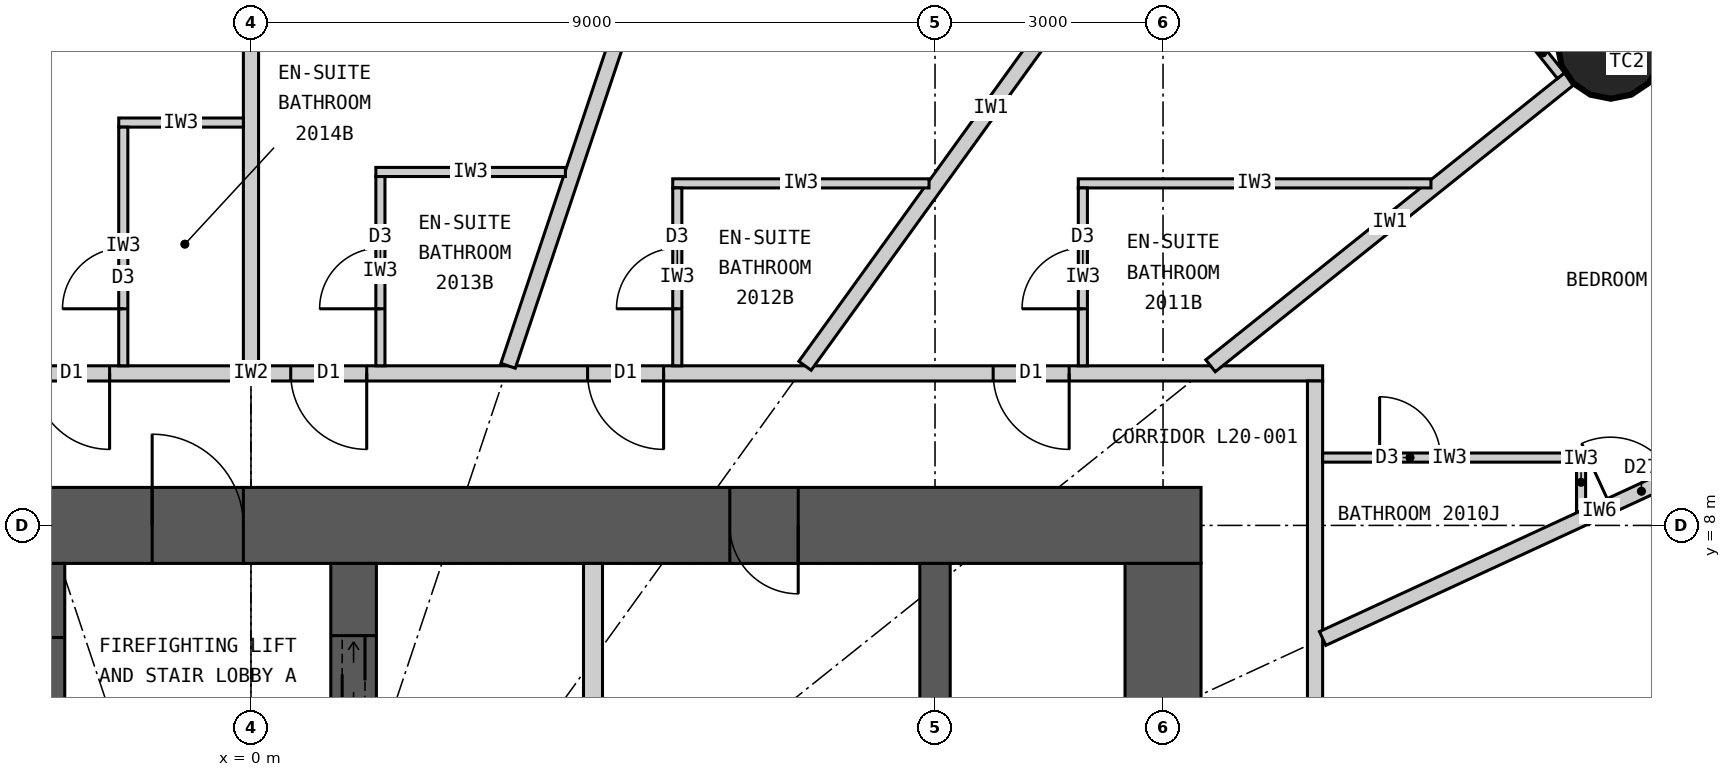
"""IFC4 building model, lengths in metres.
Left out: names, types, materials, properties, quantities, classifications, styles, units other than length and angle.
Written with IfcOpenShell. Run it as: python <this file> out.ifc"""

import sys

from ifc_helpers import new_model, si_unit, direction, frame, frame_2d, origin, origin_2d, place, context, subcontext, project, spatial, rectangle, circle, extrude, element, fill, save


model = new_model("IFC4")
c1 = context("Model", 3, precision=1e-05, world=origin(), true_north=direction((0.0, 1.0)))
c2 = subcontext(c1, "Body", "Model", "MODEL_VIEW")
j1 = project(units=[si_unit("LENGTHUNIT", "METRE"), si_unit("PLANEANGLEUNIT", "RADIAN")], contexts=[c1])
p1 = place(None, origin())
s1 = spatial("IfcSite", under=j1, at=p1, CompositionType="ELEMENT")
p2 = place(p1, origin())
s2 = spatial("IfcBuilding", under=s1, at=p2, CompositionType="ELEMENT")
p3 = place(p2, frame((0.0, 0.0, 80.4)))
s3 = spatial("IfcBuildingStorey", under=s2, at=p3, CompositionType="ELEMENT", Elevation=80.4)
p4 = place(p3, frame((17.892, 14.313, 0.0), z_axis=(0.0, 0.0, 1.0), x_axis=(1.0, 0.0, 0.0)))
e1 = element("IfcColumn", 1, at=p4, inside=s3, PredefinedType="COLUMN", context=c2, shape_type="SweptSolid", body=[
    extrude(circle(Radius=0.7, at=origin_2d()), origin(), (0.0, 0.0, 1.0), 3.3),
])
p5 = place(p3, frame((-12.5, 8.0, 0.0), z_axis=(0.0, 0.0, 1.0), x_axis=(1.0, 0.0, 0.0)))
e2 = element("IfcWall", 2, at=p5, inside=s3, PredefinedType="SHEAR", context=c2, shape_type="SweptSolid", body=[
    extrude(rectangle(XDim=25.0, YDim=1.0, at=frame_2d((12.5, 0.0))), origin(), (0.0, 0.0, 1.0), 3.3),
])
p6 = place(p5, frame((11.2, 0.0, 0.0)))
e3 = element("IfcOpeningElement", 3, at=p6, cuts=e2, PredefinedType="OPENING", context=c2, shape_type="SweptSolid", body=[
    extrude(rectangle(XDim=1.2, YDim=2.2, at=frame_2d((0.6, 1.1))), frame((0.0, 0.51, 0.0), z_axis=(0.0, -1.0, 0.0), x_axis=(1.0, 0.0, 0.0)), (0.0, 0.0, 1.0), 1.02),
])
p7 = place(p5, frame((18.8, 0.0, 0.0)))
e4 = element("IfcOpeningElement", 4, at=p7, cuts=e2, PredefinedType="OPENING", context=c2, shape_type="SweptSolid", body=[
    extrude(rectangle(XDim=0.9, YDim=2.2, at=frame_2d((0.45, 1.1))), frame((0.0, 0.51, 0.0), z_axis=(0.0, -1.0, 0.0), x_axis=(1.0, 0.0, 0.0)), (0.0, 0.0, 1.0), 1.02),
])
p8 = place(p3, frame((12.0, -7.5, 0.0), z_axis=(0.0, 0.0, 1.0), x_axis=(0.0, 1.0, 0.0)))
e5 = element("IfcWall", 5, at=p8, inside=s3, PredefinedType="SHEAR", context=c2, shape_type="SweptSolid", body=[
    extrude(rectangle(XDim=15.0, YDim=1.0, at=frame_2d((7.5, 0.0))), origin(), (0.0, 0.0, 1.0), 3.3),
])
p9 = place(p8, frame((6.6, 0.0, 0.0)))
e6 = element("IfcOpeningElement", 6, at=p9, cuts=e5, PredefinedType="OPENING", context=c2, shape_type="SweptSolid", body=[
    extrude(rectangle(XDim=1.8, YDim=2.2, at=frame_2d((0.9, 1.1))), frame((0.0, 0.51, 0.0), z_axis=(0.0, -1.0, 0.0), x_axis=(1.0, 0.0, 0.0)), (0.0, 0.0, 1.0), 1.02),
])
p10 = place(p3, frame((9.0, 4.5, 0.0), z_axis=(0.0, 0.0, 1.0), x_axis=(0.0, 1.0, 0.0)))
e7 = element("IfcWall", 7, at=p10, inside=s3, PredefinedType="SHEAR", context=c2, shape_type="SweptSolid", body=[
    extrude(rectangle(XDim=3.0, YDim=0.4, at=frame_2d((1.5, 0.0))), origin(), (0.0, 0.0, 1.0), 3.3),
])
p11 = place(p3, frame((-2.75, 4.5, 0.0), z_axis=(0.0, 0.0, 1.0), x_axis=(0.0, 1.0, 0.0)))
e8 = element("IfcWall", 8, at=p11, inside=s3, PredefinedType="SHEAR", context=c2, shape_type="SweptSolid", body=[
    extrude(rectangle(XDim=3.0, YDim=0.6, at=frame_2d((1.5, 0.0))), origin(), (0.0, 0.0, 1.0), 3.3),
])
p12 = place(p11, frame((0.925, 0.0, 0.0)))
e9 = element("IfcOpeningElement", 9, at=p12, cuts=e8, PredefinedType="OPENING", context=c2, shape_type="SweptSolid", body=[
    extrude(rectangle(XDim=1.1, YDim=2.2, at=frame_2d((0.55, 1.1))), frame((0.0, 0.31, 0.0), z_axis=(0.0, -1.0, 0.0), x_axis=(1.0, 0.0, 0.0)), (0.0, 0.0, 1.0), 0.62),
])
p13 = place(p3, frame((1.35, 4.5, 0.0), z_axis=(0.0, 0.0, 1.0), x_axis=(0.0, 1.0, 0.0)))
e10 = element("IfcWall", 10, at=p13, inside=s3, PredefinedType="SHEAR", context=c2, shape_type="SweptSolid", body=[
    extrude(rectangle(XDim=3.0, YDim=0.6, at=frame_2d((1.5, 0.0))), origin(), (0.0, 0.0, 1.0), 3.3),
])
p14 = place(p13, frame((0.95, 0.0, 0.0)))
e11 = element("IfcOpeningElement", 11, at=p14, cuts=e10, PredefinedType="OPENING", context=c2, shape_type="SweptSolid", body=[
    extrude(rectangle(XDim=1.1, YDim=2.2, at=frame_2d((0.55, 1.1))), frame((0.0, 0.31, 0.0), z_axis=(0.0, -1.0, 0.0), x_axis=(1.0, 0.0, 0.0)), (0.0, 0.0, 1.0), 0.62),
])
p15 = place(p3, frame((4.5, 4.5, 0.0), z_axis=(0.0, 0.0, 1.0), x_axis=(0.0, 1.0, 0.0)))
e12 = element("IfcWall", 12, at=p15, inside=s3, PredefinedType="PARTITIONING", context=c2, shape_type="SweptSolid", body=[
    extrude(rectangle(XDim=3.0, YDim=0.25, at=frame_2d((1.5, 0.0))), origin(), (0.0, 0.0, 1.0), 3.3),
])
p16 = place(p3, frame((-14.1, 10.0, 0.0), z_axis=(0.0, 0.0, 1.0), x_axis=(1.0, 0.0, 0.0)))
e13 = element("IfcWall", 13, at=p16, inside=s3, PredefinedType="PARTITIONING", context=c2, shape_type="SweptSolid", body=[
    extrude(rectangle(XDim=28.2, YDim=0.2, at=frame_2d((14.1, 0.0))), origin(), (0.0, 0.0, 1.0), 3.12),
])
p17 = place(p16, frame((23.865, 0.0, 0.0)))
e14 = element("IfcOpeningElement", 14, at=p17, cuts=e13, PredefinedType="OPENING", context=c2, shape_type="SweptSolid", body=[
    extrude(rectangle(XDim=1.0, YDim=2.2, at=frame_2d((0.5, 1.1))), frame((0.0, 0.11, 0.0), z_axis=(0.0, -1.0, 0.0), x_axis=(1.0, 0.0, 0.0)), (0.0, 0.0, 1.0), 0.22),
])
p18 = place(p16, frame((18.529, 0.0, 0.0)))
e15 = element("IfcOpeningElement", 15, at=p18, cuts=e13, PredefinedType="OPENING", context=c2, shape_type="SweptSolid", body=[
    extrude(rectangle(XDim=1.0, YDim=2.2, at=frame_2d((0.5, 1.1))), frame((0.0, 0.11, 0.0), z_axis=(0.0, -1.0, 0.0), x_axis=(1.0, 0.0, 0.0)), (0.0, 0.0, 1.0), 0.22),
])
p19 = place(p16, frame((14.623, 0.0, 0.0)))
e16 = element("IfcOpeningElement", 16, at=p19, cuts=e13, PredefinedType="OPENING", context=c2, shape_type="SweptSolid", body=[
    extrude(rectangle(XDim=1.0, YDim=2.2, at=frame_2d((0.5, 1.1))), frame((0.0, 0.11, 0.0), z_axis=(0.0, -1.0, 0.0), x_axis=(1.0, 0.0, 0.0)), (0.0, 0.0, 1.0), 0.22),
])
p20 = place(p16, frame((11.24, 0.0, 0.0)))
e17 = element("IfcOpeningElement", 17, at=p20, cuts=e13, PredefinedType="OPENING", context=c2, shape_type="SweptSolid", body=[
    extrude(rectangle(XDim=1.0, YDim=2.2, at=frame_2d((0.5, 1.1))), frame((0.0, 0.11, 0.0), z_axis=(0.0, -1.0, 0.0), x_axis=(1.0, 0.0, 0.0)), (0.0, 0.0, 1.0), 0.22),
])
p21 = place(p16, frame((8.671, 0.0, 0.0)))
e18 = element("IfcOpeningElement", 18, at=p21, cuts=e13, PredefinedType="OPENING", context=c2, shape_type="SweptSolid", body=[
    extrude(rectangle(XDim=1.0, YDim=2.2, at=frame_2d((0.5, 1.1))), frame((0.0, 0.11, 0.0), z_axis=(0.0, -1.0, 0.0), x_axis=(1.0, 0.0, 0.0)), (0.0, 0.0, 1.0), 0.22),
])
p22 = place(p16, frame((2.801, 0.0, 0.0)))
e19 = element("IfcOpeningElement", 19, at=p22, cuts=e13, PredefinedType="OPENING", context=c2, shape_type="SweptSolid", body=[
    extrude(rectangle(XDim=1.0, YDim=2.2, at=frame_2d((0.5, 1.1))), frame((0.0, 0.11, 0.0), z_axis=(0.0, -1.0, 0.0), x_axis=(1.0, 0.0, 0.0)), (0.0, 0.0, 1.0), 0.22),
])
p23 = place(p3, frame((14.0, -9.9, 0.0), z_axis=(0.0, 0.0, 1.0), x_axis=(0.0, 1.0, 0.0)))
e20 = element("IfcWall", 20, at=p23, inside=s3, PredefinedType="PARTITIONING", context=c2, shape_type="SweptSolid", body=[
    extrude(rectangle(XDim=19.8, YDim=0.2, at=frame_2d((9.9, 0.0))), origin(), (0.0, 0.0, 1.0), 3.12),
])
p24 = place(p23, frame((5.948, 0.0, 0.0)))
e21 = element("IfcOpeningElement", 21, at=p24, cuts=e20, PredefinedType="OPENING", context=c2, shape_type="SweptSolid", body=[
    extrude(rectangle(XDim=1.0, YDim=2.2, at=frame_2d((0.5, 1.1))), frame((0.0, 0.11, 0.0), z_axis=(0.0, -1.0, 0.0), x_axis=(1.0, 0.0, 0.0)), (0.0, 0.0, 1.0), 0.22),
])
p25 = place(p23, frame((11.46, 0.0, 0.0)))
e22 = element("IfcOpeningElement", 22, at=p25, cuts=e20, PredefinedType="OPENING", context=c2, shape_type="SweptSolid", body=[
    extrude(rectangle(XDim=1.0, YDim=2.2, at=frame_2d((0.5, 1.1))), frame((0.0, 0.11, 0.0), z_axis=(0.0, -1.0, 0.0), x_axis=(1.0, 0.0, 0.0)), (0.0, 0.0, 1.0), 0.22),
])
p26 = place(p3, frame((14.1, 6.512, 0.0), z_axis=(0.0, 0.0, 1.0), x_axis=(0.907832871056, 0.419332181247, 0.0)))
e23 = element("IfcWall", 23, at=p26, inside=s3, PredefinedType="PARTITIONING", context=c2, shape_type="SweptSolid", body=[
    extrude(rectangle(XDim=8.023, YDim=0.2, at=frame_2d((4.011, 0.0))), origin(), (0.0, 0.0, 1.0), 2.32),
])
p27 = place(p26, frame((4.17, 0.0, 0.0)))
e24 = element("IfcOpeningElement", 24, at=p27, cuts=e23, PredefinedType="OPENING", context=c2, shape_type="SweptSolid", body=[
    extrude(rectangle(XDim=0.9, YDim=2.1, at=frame_2d((0.45, 1.05))), frame((0.0, 0.11, 0.0), z_axis=(0.0, -1.0, 0.0), x_axis=(1.0, 0.0, 0.0)), (0.0, 0.0, 1.0), 0.22),
])
p28 = place(p3, frame((12.625, 10.1, 0.0), z_axis=(0.0, 0.0, 1.0), x_axis=(0.780892451574, 0.624665493744, 0.0)))
e25 = element("IfcWall", 25, at=p28, inside=s3, PredefinedType="PARTITIONING", context=c2, shape_type="SweptSolid", body=[
    extrude(rectangle(XDim=6.045, YDim=0.2, at=frame_2d((3.022, 0.0))), origin(), (0.0, 0.0, 1.0), 2.32),
])
p29 = place(p3, frame((7.289, 10.1, 0.0), z_axis=(0.0, 0.0, 1.0), x_axis=(0.585198353053, 0.810890182197, 0.0)))
e26 = element("IfcWall", 26, at=p29, inside=s3, PredefinedType="PARTITIONING", context=c2, shape_type="SweptSolid", body=[
    extrude(rectangle(XDim=8.36, YDim=0.2, at=frame_2d((4.18, 0.0))), origin(), (0.0, 0.0, 1.0), 2.32),
])
p30 = place(p3, frame((3.383, 10.1, 0.0), z_axis=(0.0, 0.0, 1.0), x_axis=(0.31759592231, 0.948226149256, 0.0)))
e27 = element("IfcWall", 27, at=p30, inside=s3, PredefinedType="PARTITIONING", context=c2, shape_type="SweptSolid", body=[
    extrude(rectangle(XDim=9.098, YDim=0.2, at=frame_2d((4.549, 0.0))), origin(), (0.0, 0.0, 1.0), 2.32),
])
p31 = place(p3, frame((0.0, 10.1, 0.0), z_axis=(0.0, 0.0, 1.0), x_axis=(0.0, 1.0, 0.0)))
e28 = element("IfcWall", 28, at=p31, inside=s3, PredefinedType="PARTITIONING", context=c2, shape_type="SweptSolid", body=[
    extrude(rectangle(XDim=9.25, YDim=0.2, at=frame_2d((4.625, 0.0))), origin(), (0.0, 0.0, 1.0), 2.32),
])
p32 = place(p3, frame((17.5, 8.183, 0.0), z_axis=(0.0, 0.0, 1.0), x_axis=(0.0, 1.0, 0.0)))
e29 = element("IfcWall", 29, at=p32, inside=s3, PredefinedType="PARTITIONING", context=c2, shape_type="SweptSolid", body=[
    extrude(rectangle(XDim=0.77, YDim=0.12, at=frame_2d((0.385, 0.0))), origin(), (0.0, 0.0, 1.0), 3.12),
])
p33 = place(p3, frame((14.1, 8.893, 0.0), z_axis=(0.0, 0.0, 1.0), x_axis=(1.0, 0.0, 0.0)))
e30 = element("IfcWall", 30, at=p33, inside=s3, PredefinedType="PARTITIONING", context=c2, shape_type="SweptSolid", body=[
    extrude(rectangle(XDim=3.34, YDim=0.12, at=frame_2d((1.67, 0.0))), origin(), (0.0, 0.0, 1.0), 3.12),
])
p34 = place(p33, frame((0.75, 0.0, 0.0)))
e31 = element("IfcOpeningElement", 31, at=p34, cuts=e30, PredefinedType="OPENING", context=c2, shape_type="SweptSolid", body=[
    extrude(rectangle(XDim=0.8, YDim=2.1, at=frame_2d((0.4, 1.05))), frame((0.0, 0.07, 0.0), z_axis=(0.0, -1.0, 0.0), x_axis=(1.0, 0.0, 0.0)), (0.0, 0.0, 1.0), 0.14),
])
p35 = place(p3, frame((15.525, 12.5, 0.0), z_axis=(0.0, 0.0, 1.0), x_axis=(-1.0, 0.0, 0.0)))
e32 = element("IfcWall", 32, at=p35, inside=s3, PredefinedType="PARTITIONING", context=c2, shape_type="SweptSolid", body=[
    extrude(rectangle(XDim=4.64, YDim=0.12, at=frame_2d((2.32, 0.0))), origin(), (0.0, 0.0, 1.0), 3.12),
])
p36 = place(p3, frame((10.945, 10.1, 0.0), z_axis=(0.0, 0.0, 1.0), x_axis=(0.0, 1.0, 0.0)))
e33 = element("IfcWall", 33, at=p36, inside=s3, PredefinedType="PARTITIONING", context=c2, shape_type="SweptSolid", body=[
    extrude(rectangle(XDim=2.34, YDim=0.12, at=frame_2d((1.17, 0.0))), origin(), (0.0, 0.0, 1.0), 3.12),
])
p37 = place(p36, frame((0.75, 0.0, 0.0)))
e34 = element("IfcOpeningElement", 34, at=p37, cuts=e33, PredefinedType="OPENING", context=c2, shape_type="SweptSolid", body=[
    extrude(rectangle(XDim=0.8, YDim=2.1, at=frame_2d((0.4, 1.05))), frame((0.0, 0.07, 0.0), z_axis=(0.0, -1.0, 0.0), x_axis=(1.0, 0.0, 0.0)), (0.0, 0.0, 1.0), 0.14),
])
p38 = place(p3, frame((8.921, 12.5, 0.0), z_axis=(0.0, 0.0, 1.0), x_axis=(-1.0, 0.0, 0.0)))
e35 = element("IfcWall", 35, at=p38, inside=s3, PredefinedType="PARTITIONING", context=c2, shape_type="SweptSolid", body=[
    extrude(rectangle(XDim=3.372, YDim=0.12, at=frame_2d((1.686, 0.0))), origin(), (0.0, 0.0, 1.0), 3.12),
])
p39 = place(p3, frame((5.609, 10.1, 0.0), z_axis=(0.0, 0.0, 1.0), x_axis=(0.0, 1.0, 0.0)))
e36 = element("IfcWall", 36, at=p39, inside=s3, PredefinedType="PARTITIONING", context=c2, shape_type="SweptSolid", body=[
    extrude(rectangle(XDim=2.34, YDim=0.12, at=frame_2d((1.17, 0.0))), origin(), (0.0, 0.0, 1.0), 3.12),
])
p40 = place(p39, frame((0.75, 0.0, 0.0)))
e37 = element("IfcOpeningElement", 37, at=p40, cuts=e36, PredefinedType="OPENING", context=c2, shape_type="SweptSolid", body=[
    extrude(rectangle(XDim=0.8, YDim=2.1, at=frame_2d((0.4, 1.05))), frame((0.0, 0.07, 0.0), z_axis=(0.0, -1.0, 0.0), x_axis=(1.0, 0.0, 0.0)), (0.0, 0.0, 1.0), 0.14),
])
p41 = place(p3, frame((4.137, 12.65, 0.0), z_axis=(0.0, 0.0, 1.0), x_axis=(-1.0, 0.0, 0.0)))
e38 = element("IfcWall", 38, at=p41, inside=s3, PredefinedType="PARTITIONING", context=c2, shape_type="SweptSolid", body=[
    extrude(rectangle(XDim=2.494, YDim=0.12, at=frame_2d((1.247, 0.0))), origin(), (0.0, 0.0, 1.0), 3.12),
])
p42 = place(p3, frame((1.703, 10.1, 0.0), z_axis=(0.0, 0.0, 1.0), x_axis=(0.0, 1.0, 0.0)))
e39 = element("IfcWall", 39, at=p42, inside=s3, PredefinedType="PARTITIONING", context=c2, shape_type="SweptSolid", body=[
    extrude(rectangle(XDim=2.49, YDim=0.12, at=frame_2d((1.245, 0.0))), origin(), (0.0, 0.0, 1.0), 3.12),
])
p43 = place(p42, frame((0.75, 0.0, 0.0)))
e40 = element("IfcOpeningElement", 40, at=p43, cuts=e39, PredefinedType="OPENING", context=c2, shape_type="SweptSolid", body=[
    extrude(rectangle(XDim=0.8, YDim=2.1, at=frame_2d((0.4, 1.05))), frame((0.0, 0.07, 0.0), z_axis=(0.0, -1.0, 0.0), x_axis=(1.0, 0.0, 0.0)), (0.0, 0.0, 1.0), 0.14),
])
p44 = place(p3, frame((-0.1, 13.3, 0.0), z_axis=(0.0, 0.0, 1.0), x_axis=(-1.0, 0.0, 0.0)))
e41 = element("IfcWall", 41, at=p44, inside=s3, PredefinedType="PARTITIONING", context=c2, shape_type="SweptSolid", body=[
    extrude(rectangle(XDim=1.64, YDim=0.12, at=frame_2d((0.82, 0.0))), origin(), (0.0, 0.0, 1.0), 3.12),
])
p45 = place(p3, frame((-1.68, 10.1, 0.0), z_axis=(0.0, 0.0, 1.0), x_axis=(0.0, 1.0, 0.0)))
e42 = element("IfcWall", 42, at=p45, inside=s3, PredefinedType="PARTITIONING", context=c2, shape_type="SweptSolid", body=[
    extrude(rectangle(XDim=3.14, YDim=0.12, at=frame_2d((1.57, 0.0))), origin(), (0.0, 0.0, 1.0), 3.12),
])
p46 = place(p45, frame((0.75, 0.0, 0.0)))
e43 = element("IfcOpeningElement", 43, at=p46, cuts=e42, PredefinedType="OPENING", context=c2, shape_type="SweptSolid", body=[
    extrude(rectangle(XDim=0.8, YDim=2.1, at=frame_2d((0.4, 1.05))), frame((0.0, 0.07, 0.0), z_axis=(0.0, -1.0, 0.0), x_axis=(1.0, 0.0, 0.0)), (0.0, 0.0, 1.0), 0.14),
])
p47 = place(p3, frame((17.236, 13.917, 0.0), z_axis=(0.0, 0.0, 1.0), x_axis=(-0.624695047554, 0.780868809443, 0.0)))
e44 = element("IfcWall", 44, at=p47, inside=s3, PredefinedType="PARTITIONING", context=c2, shape_type="SweptSolid", body=[
    extrude(rectangle(XDim=0.768, YDim=0.12, at=frame_2d((0.384, 0.0))), origin(), (0.0, 0.0, 1.0), 3.12),
])
p48 = place(p34, origin())
e45 = element("IfcDoor", 45, at=p48, inside=s3, OperationType="SINGLE_SWING_LEFT", PredefinedType="DOOR", context=c2, shape_type="SweptSolid", body=[
    extrude(rectangle(XDim=0.8, YDim=2.1, at=frame_2d((0.4, 1.05))), frame((0.0, 0.025, 0.0), z_axis=(0.0, -1.0, 0.0), x_axis=(1.0, 0.0, 0.0)), (0.0, 0.0, 1.0), 0.05),
])
fill(e31, e45)
p49 = place(p27, origin())
e46 = element("IfcDoor", 46, at=p49, inside=s3, OperationType="SINGLE_SWING_LEFT", PredefinedType="DOOR", context=c2, shape_type="SweptSolid", body=[
    extrude(rectangle(XDim=0.9, YDim=2.1, at=frame_2d((0.45, 1.05))), frame((0.0, 0.025, 0.0), z_axis=(0.0, -1.0, 0.0), x_axis=(1.0, 0.0, 0.0)), (0.0, 0.0, 1.0), 0.05),
])
fill(e24, e46)
p50 = place(p37, origin())
e47 = element("IfcDoor", 47, at=p50, inside=s3, OperationType="SINGLE_SWING_LEFT", PredefinedType="DOOR", context=c2, shape_type="SweptSolid", body=[
    extrude(rectangle(XDim=0.8, YDim=2.1, at=frame_2d((0.4, 1.05))), frame((0.0, 0.025, 0.0), z_axis=(0.0, -1.0, 0.0), x_axis=(1.0, 0.0, 0.0)), (0.0, 0.0, 1.0), 0.05),
])
fill(e34, e47)
p51 = place(p17, origin())
e48 = element("IfcDoor", 48, at=p51, inside=s3, OperationType="SINGLE_SWING_RIGHT", PredefinedType="DOOR", context=c2, shape_type="SweptSolid", body=[
    extrude(rectangle(XDim=1.0, YDim=2.2, at=frame_2d((0.5, 1.1))), frame((0.0, 0.025, 0.0), z_axis=(0.0, -1.0, 0.0), x_axis=(1.0, 0.0, 0.0)), (0.0, 0.0, 1.0), 0.05),
])
fill(e14, e48)
p52 = place(p40, origin())
e49 = element("IfcDoor", 49, at=p52, inside=s3, OperationType="SINGLE_SWING_LEFT", PredefinedType="DOOR", context=c2, shape_type="SweptSolid", body=[
    extrude(rectangle(XDim=0.8, YDim=2.1, at=frame_2d((0.4, 1.05))), frame((0.0, 0.025, 0.0), z_axis=(0.0, -1.0, 0.0), x_axis=(1.0, 0.0, 0.0)), (0.0, 0.0, 1.0), 0.05),
])
fill(e37, e49)
p53 = place(p18, origin())
e50 = element("IfcDoor", 50, at=p53, inside=s3, OperationType="SINGLE_SWING_RIGHT", PredefinedType="DOOR", context=c2, shape_type="SweptSolid", body=[
    extrude(rectangle(XDim=1.0, YDim=2.2, at=frame_2d((0.5, 1.1))), frame((0.0, 0.025, 0.0), z_axis=(0.0, -1.0, 0.0), x_axis=(1.0, 0.0, 0.0)), (0.0, 0.0, 1.0), 0.05),
])
fill(e15, e50)
p54 = place(p43, origin())
e51 = element("IfcDoor", 51, at=p54, inside=s3, OperationType="SINGLE_SWING_LEFT", PredefinedType="DOOR", context=c2, shape_type="SweptSolid", body=[
    extrude(rectangle(XDim=0.8, YDim=2.1, at=frame_2d((0.4, 1.05))), frame((0.0, 0.025, 0.0), z_axis=(0.0, -1.0, 0.0), x_axis=(1.0, 0.0, 0.0)), (0.0, 0.0, 1.0), 0.05),
])
fill(e40, e51)
p55 = place(p19, origin())
e52 = element("IfcDoor", 52, at=p55, inside=s3, OperationType="SINGLE_SWING_RIGHT", PredefinedType="DOOR", context=c2, shape_type="SweptSolid", body=[
    extrude(rectangle(XDim=1.0, YDim=2.2, at=frame_2d((0.5, 1.1))), frame((0.0, 0.025, 0.0), z_axis=(0.0, -1.0, 0.0), x_axis=(1.0, 0.0, 0.0)), (0.0, 0.0, 1.0), 0.05),
])
fill(e16, e52)
p56 = place(p46, origin())
e53 = element("IfcDoor", 53, at=p56, inside=s3, OperationType="SINGLE_SWING_LEFT", PredefinedType="DOOR", context=c2, shape_type="SweptSolid", body=[
    extrude(rectangle(XDim=0.8, YDim=2.1, at=frame_2d((0.4, 1.05))), frame((0.0, 0.025, 0.0), z_axis=(0.0, -1.0, 0.0), x_axis=(1.0, 0.0, 0.0)), (0.0, 0.0, 1.0), 0.05),
])
fill(e43, e53)
p57 = place(p20, origin())
e54 = element("IfcDoor", 54, at=p57, inside=s3, OperationType="SINGLE_SWING_RIGHT", PredefinedType="DOOR", context=c2, shape_type="SweptSolid", body=[
    extrude(rectangle(XDim=1.0, YDim=2.2, at=frame_2d((0.5, 1.1))), frame((0.0, 0.025, 0.0), z_axis=(0.0, -1.0, 0.0), x_axis=(1.0, 0.0, 0.0)), (0.0, 0.0, 1.0), 0.05),
])
fill(e17, e54)
p58 = place(p6, origin())
e55 = element("IfcDoor", 55, at=p58, inside=s3, OperationType="SINGLE_SWING_LEFT", PredefinedType="DOOR", context=c2, shape_type="SweptSolid", body=[
    extrude(rectangle(XDim=1.2, YDim=2.2, at=frame_2d((0.6, 1.1))), frame((0.0, 0.025, 0.0), z_axis=(0.0, -1.0, 0.0), x_axis=(1.0, 0.0, 0.0)), (0.0, 0.0, 1.0), 0.05),
])
fill(e3, e55)
p59 = place(p14, origin())
e56 = element("IfcDoor", 56, at=p59, inside=s3, OperationType="DOUBLE_DOOR_SLIDING", PredefinedType="DOOR", context=c2, shape_type="SweptSolid", body=[
    extrude(rectangle(XDim=1.1, YDim=2.2, at=frame_2d((0.55, 1.1))), frame((0.0, 0.025, 0.0), z_axis=(0.0, -1.0, 0.0), x_axis=(1.0, 0.0, 0.0)), (0.0, 0.0, 1.0), 0.05),
])
fill(e11, e56)
p60 = place(p7, origin())
e57 = element("IfcDoor", 57, at=p60, inside=s3, OperationType="SINGLE_SWING_RIGHT", PredefinedType="DOOR", context=c2, shape_type="SweptSolid", body=[
    extrude(rectangle(XDim=0.9, YDim=2.2, at=frame_2d((0.45, 1.1))), frame((0.0, 0.025, 0.0), z_axis=(0.0, -1.0, 0.0), x_axis=(1.0, 0.0, 0.0)), (0.0, 0.0, 1.0), 0.05),
])
fill(e4, e57)
save(model, sys.argv[1])
